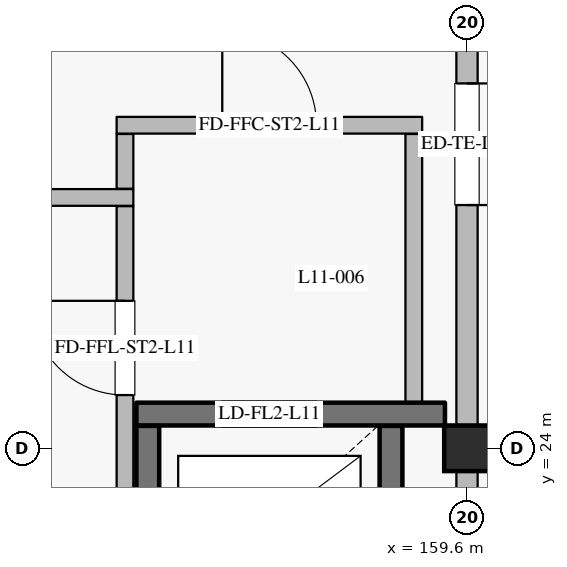
"""IFC4 building model, lengths in metres.
Left out: names, types, materials, properties, quantities, classifications, styles, units other than length and angle.
Written with IfcOpenShell. Run it as: python <this file> out.ifc"""

import sys

from ifc_helpers import new_model, si_unit, direction, frame, frame_2d, origin, origin_2d, place, context, subcontext, project, spatial, rectangle, extrude, element, fill, save


model = new_model("IFC4")
c1 = context("Model", 3, precision=1e-05, world=origin(), true_north=direction((0.0, 1.0)))
c2 = subcontext(c1, "Body", "Model", "MODEL_VIEW")
j1 = project(units=[si_unit("LENGTHUNIT", "METRE"), si_unit("PLANEANGLEUNIT", "RADIAN")], contexts=[c1])
p1 = place(None, origin())
s1 = spatial("IfcSite", under=j1, at=p1, CompositionType="ELEMENT")
p2 = place(p1, origin())
s2 = spatial("IfcBuilding", under=s1, at=p2, CompositionType="ELEMENT")
p3 = place(p2, frame((0.0, 0.0, 47.4)))
s3 = spatial("IfcBuildingStorey", under=s2, at=p3, CompositionType="ELEMENT", Elevation=47.4)
p4 = place(p3, frame((159.6, 24.0, 0.0), z_axis=(0.0, 0.0, 1.0), x_axis=(1.0, 0.0, 0.0)))
e1 = element("IfcColumn", 1, at=p4, inside=s3, PredefinedType="COLUMN", context=c2, shape_type="SweptSolid", body=[
    extrude(rectangle(XDim=0.6, YDim=0.6, at=origin_2d()), origin(), (0.0, 0.0, 1.0), 4.2),
])
p5 = place(p3, frame((159.6, 31.7, 0.0), z_axis=(0.0, 0.0, 1.0), x_axis=(0.0, -1.0, 0.0)))
e2 = element("IfcWall", 2, at=p5, inside=s3, PredefinedType="SOLIDWALL", context=c2, shape_type="SweptSolid", body=[
    extrude(rectangle(XDim=7.4, YDim=0.28, at=frame_2d((3.7, 0.0))), origin(), (0.0, 0.0, 1.0), 3.3),
])
p6 = place(p5, frame((2.9, 0.0, 0.0)))
e3 = element("IfcOpeningElement", 3, at=p6, cuts=e2, PredefinedType="OPENING", context=c2, shape_type="SweptSolid", body=[
    extrude(rectangle(XDim=1.6, YDim=2.25, at=frame_2d((0.8, 1.125))), frame((0.0, 0.15, 0.0), z_axis=(0.0, -1.0, 0.0), x_axis=(1.0, 0.0, 0.0)), (0.0, 0.0, 1.0), 0.3),
])
p7 = place(p3, frame((159.6, 23.7, 0.0), z_axis=(0.0, 0.0, 1.0), x_axis=(0.0, -1.0, 0.0)))
e4 = element("IfcWall", 4, at=p7, inside=s3, PredefinedType="SOLIDWALL", context=c2, shape_type="SweptSolid", body=[
    extrude(rectangle(XDim=7.4, YDim=0.28, at=frame_2d((3.7, 0.0))), origin(), (0.0, 0.0, 1.0), 3.3),
])
p8 = place(p7, frame((2.5, 0.0, 0.75)))
e5 = element("IfcOpeningElement", 5, at=p8, cuts=e4, PredefinedType="OPENING", context=c2, shape_type="SweptSolid", body=[
    extrude(rectangle(XDim=2.4, YDim=1.65, at=frame_2d((1.2, 0.825))), frame((0.0, 0.15, 0.0), z_axis=(0.0, -1.0, 0.0), x_axis=(1.0, 0.0, 0.0)), (0.0, 0.0, 1.0), 0.3),
])
p9 = place(p3, frame((158.6, 21.705, 0.0), z_axis=(0.0, 0.0, 1.0), x_axis=(0.0, 1.0, 0.0)))
e6 = element("IfcWall", 6, at=p9, inside=s3, PredefinedType="SHEAR", context=c2, shape_type="SweptSolid", body=[
    extrude(rectangle(XDim=2.59, YDim=0.3, at=frame_2d((1.295, 0.0))), origin(), (0.0, 0.0, 1.0), 3.935),
])
p10 = place(p3, frame((159.31, 24.45, 0.0), z_axis=(0.0, 0.0, 1.0), x_axis=(-1.0, 0.0, 0.0)))
e7 = element("IfcWall", 7, at=p10, inside=s3, PredefinedType="SHEAR", context=c2, shape_type="SweptSolid", body=[
    extrude(rectangle(XDim=4.06, YDim=0.3, at=frame_2d((2.03, 0.0))), origin(), (0.0, 0.0, 1.0), 3.935),
])
p11 = place(p10, frame((1.685, 0.0, 0.0)))
e8 = element("IfcOpeningElement", 8, at=p11, cuts=e7, PredefinedType="OPENING", context=c2, shape_type="SweptSolid", body=[
    extrude(rectangle(XDim=1.25, YDim=2.25, at=frame_2d((0.625, 1.125))), frame((0.0, 0.16, 0.0), z_axis=(0.0, -1.0, 0.0), x_axis=(1.0, 0.0, 0.0)), (0.0, 0.0, 1.0), 0.32),
])
p12 = place(p3, frame((155.4, 24.295, 0.0), z_axis=(0.0, 0.0, 1.0), x_axis=(0.0, -1.0, 0.0)))
e9 = element("IfcWall", 9, at=p12, inside=s3, PredefinedType="SHEAR", context=c2, shape_type="SweptSolid", body=[
    extrude(rectangle(XDim=2.59, YDim=0.3, at=frame_2d((1.295, 0.0))), origin(), (0.0, 0.0, 1.0), 3.935),
])
p13 = place(p3, frame((151.39, 27.3, 0.0), z_axis=(0.0, 0.0, 1.0), x_axis=(1.0, 0.0, 0.0)))
e10 = element("IfcWall", 10, at=p13, inside=s3, PredefinedType="PARTITIONING", context=c2, shape_type="SweptSolid", body=[
    extrude(rectangle(XDim=3.82, YDim=0.22, at=frame_2d((1.91, 0.0))), origin(), (0.0, 0.0, 1.0), 3.935),
])
p14 = place(p13, frame((1.35, 0.0, 0.0)))
e11 = element("IfcOpeningElement", 11, at=p14, cuts=e10, PredefinedType="OPENING", context=c2, shape_type="SweptSolid", body=[
    extrude(rectangle(XDim=1.12, YDim=2.2, at=frame_2d((0.56, 1.1))), frame((0.0, 0.12, 0.0), z_axis=(0.0, -1.0, 0.0), x_axis=(1.0, 0.0, 0.0)), (0.0, 0.0, 1.0), 0.24),
])
p15 = place(p3, frame((155.1, 21.365, 0.0), z_axis=(0.0, 0.0, 1.0), x_axis=(0.0, 1.0, 0.0)))
e12 = element("IfcWall", 12, at=p15, inside=s3, PredefinedType="PARTITIONING", context=c2, shape_type="SweptSolid", body=[
    extrude(rectangle(XDim=5.82, YDim=0.22, at=frame_2d((2.91, 0.0))), origin(), (0.0, 0.0, 1.0), 3.935),
])
p16 = place(p15, frame((3.335, 0.0, 0.0)))
e13 = element("IfcOpeningElement", 13, at=p16, cuts=e12, PredefinedType="OPENING", context=c2, shape_type="SweptSolid", body=[
    extrude(rectangle(XDim=1.24, YDim=2.2, at=frame_2d((0.62, 1.1))), frame((0.0, 0.12, 0.0), z_axis=(0.0, -1.0, 0.0), x_axis=(1.0, 0.0, 0.0)), (0.0, 0.0, 1.0), 0.24),
])
p17 = place(p3, frame((155.1, 27.415, 0.0), z_axis=(0.0, 0.0, 1.0), x_axis=(0.0, 1.0, 0.0)))
e14 = element("IfcWall", 14, at=p17, inside=s3, PredefinedType="PARTITIONING", context=c2, shape_type="SweptSolid", body=[
    extrude(rectangle(XDim=0.72, YDim=0.22, at=frame_2d((0.36, 0.0))), origin(), (0.0, 0.0, 1.0), 3.935),
])
p18 = place(p3, frame((158.9, 24.605, 0.0), z_axis=(0.0, 0.0, 1.0), x_axis=(0.0, 1.0, 0.0)))
e15 = element("IfcWall", 15, at=p18, inside=s3, PredefinedType="PARTITIONING", context=c2, shape_type="SweptSolid", body=[
    extrude(rectangle(XDim=3.53, YDim=0.22, at=frame_2d((1.765, 0.0))), origin(), (0.0, 0.0, 1.0), 3.935),
])
p19 = place(p3, frame((154.99, 28.25, 0.0), z_axis=(0.0, 0.0, 1.0), x_axis=(1.0, 0.0, 0.0)))
e16 = element("IfcWall", 16, at=p19, inside=s3, PredefinedType="PARTITIONING", context=c2, shape_type="SweptSolid", body=[
    extrude(rectangle(XDim=4.02, YDim=0.22, at=frame_2d((2.01, 0.0))), origin(), (0.0, 0.0, 1.0), 3.935),
])
p20 = place(p19, frame((1.39, 0.0, 0.0)))
e17 = element("IfcOpeningElement", 17, at=p20, cuts=e16, PredefinedType="OPENING", context=c2, shape_type="SweptSolid", body=[
    extrude(rectangle(XDim=1.24, YDim=2.2, at=frame_2d((0.62, 1.1))), frame((0.0, 0.12, 0.0), z_axis=(0.0, -1.0, 0.0), x_axis=(1.0, 0.0, 0.0)), (0.0, 0.0, 1.0), 0.24),
])
p21 = place(p6, origin())
e18 = element("IfcDoor", 18, at=p21, inside=s3, OperationType="DOUBLE_DOOR_SINGLE_SWING", PredefinedType="DOOR", context=c2, shape_type="SweptSolid", body=[
    extrude(rectangle(XDim=1.6, YDim=2.25, at=frame_2d((0.8, 1.125))), frame((0.0, 0.025, 0.0), z_axis=(0.0, -1.0, 0.0), x_axis=(1.0, 0.0, 0.0)), (0.0, 0.0, 1.0), 0.05),
])
fill(e3, e18)
p22 = place(p11, origin())
e19 = element("IfcDoor", 19, at=p22, inside=s3, OperationType="DOUBLE_DOOR_SLIDING", PredefinedType="DOOR", context=c2, shape_type="SweptSolid", body=[
    extrude(rectangle(XDim=1.25, YDim=2.25, at=frame_2d((0.625, 1.125))), frame((0.0, 0.025, 0.0), z_axis=(0.0, -1.0, 0.0), x_axis=(1.0, 0.0, 0.0)), (0.0, 0.0, 1.0), 0.05),
])
fill(e8, e19)
p23 = place(p16, origin())
e20 = element("IfcDoor", 20, at=p23, inside=s3, OperationType="SINGLE_SWING_RIGHT", PredefinedType="DOOR", context=c2, shape_type="SweptSolid", body=[
    extrude(rectangle(XDim=1.24, YDim=2.2, at=frame_2d((0.62, 1.1))), frame((0.0, 0.025, 0.0), z_axis=(0.0, -1.0, 0.0), x_axis=(1.0, 0.0, 0.0)), (0.0, 0.0, 1.0), 0.05),
])
fill(e13, e20)
p24 = place(p20, origin())
e21 = element("IfcDoor", 21, at=p24, inside=s3, OperationType="SINGLE_SWING_LEFT", PredefinedType="DOOR", context=c2, shape_type="SweptSolid", body=[
    extrude(rectangle(XDim=1.24, YDim=2.2, at=frame_2d((0.62, 1.1))), frame((0.0, 0.025, 0.0), z_axis=(0.0, -1.0, 0.0), x_axis=(1.0, 0.0, 0.0)), (0.0, 0.0, 1.0), 0.05),
])
fill(e17, e21)
save(model, sys.argv[1])
